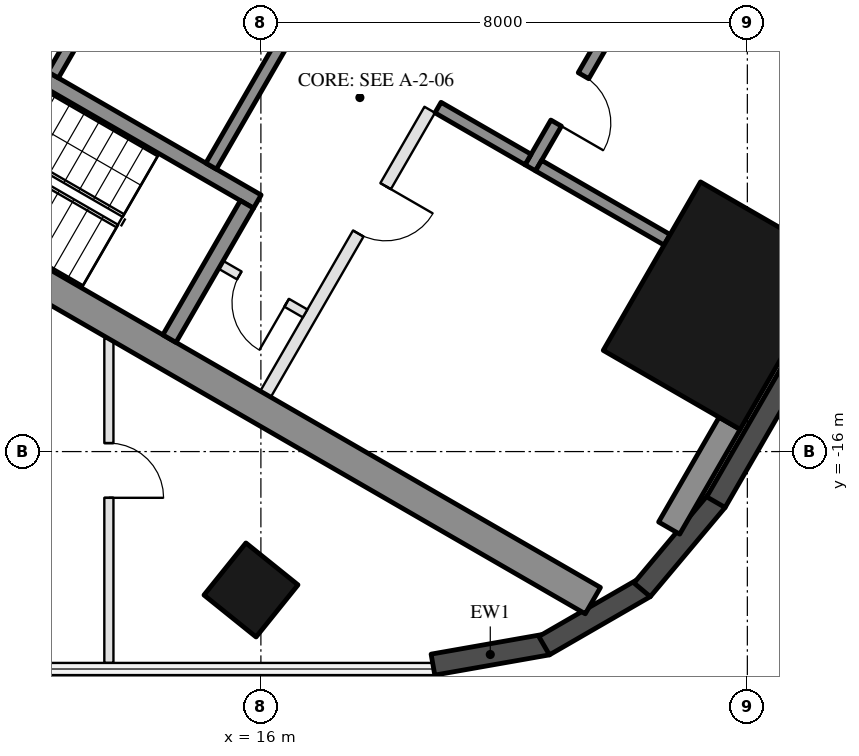
"""IFC4 building model, lengths in metres.
Left out: names, types, materials, properties, quantities, classifications, styles, units other than length and angle.
Written with IfcOpenShell. Run it as: python <this file> out.ifc"""

import sys

from ifc_helpers import new_model, si_unit, direction, frame, frame_2d, origin, origin_2d, place, context, subcontext, project, spatial, rectangle, hollow_rectangle, extrude, boolean, halfspace, element, fill, save


model = new_model("IFC4")
c1 = context("Model", 3, precision=1e-05, world=origin(), true_north=direction((0.0, 1.0)))
c2 = subcontext(c1, "Body", "Model", "MODEL_VIEW")
j1 = project(units=[si_unit("LENGTHUNIT", "METRE"), si_unit("PLANEANGLEUNIT", "RADIAN")], contexts=[c1])
p1 = place(None, origin())
s1 = spatial("IfcSite", under=j1, at=p1, CompositionType="ELEMENT")
p2 = place(p1, origin())
s2 = spatial("IfcBuilding", under=s1, at=p2, CompositionType="ELEMENT")
p3 = place(p2, frame((0.0, 0.0, 33.0)))
s3 = spatial("IfcBuildingStorey", under=s2, at=p3, CompositionType="ELEMENT", Elevation=33.0)
p4 = place(p3, frame((15.837, -18.276, 0.0), z_axis=(-0.008245813936, 0.010253018645, 0.999913437334), x_axis=(0.999965935277, -0.000282647683, 0.008249145105)))
e1 = element("IfcColumn", 1, at=p4, inside=s3, PredefinedType="COLUMN", context=c2, shape_type="SweptSolid", body=[
    boolean("DIFFERENCE", boolean("DIFFERENCE", extrude(hollow_rectangle(XDim=1.1, YDim=1.1, WallThickness=0.05, at=origin_2d()), origin(), (0.0, 0.0, 1.0), 4.5), halfspace(frame((0.0, 0.0, 0.012), z_axis=(0.0, 0.0, 1.0), x_axis=(1.0, 0.0, 0.0)), True)), halfspace(frame((0.0, 0.0, 4.493), z_axis=(0.0, 0.0, 1.0), x_axis=(1.0, 0.0, 0.0)), False)),
])
p5 = place(p3, frame((23.556, -13.6, 0.0), z_axis=(0.0, 0.0, 1.0), x_axis=(0.5, 0.866025403784, 0.0)))
e2 = element("IfcColumn", 2, at=p5, inside=s3, PredefinedType="COLUMN", context=c2, shape_type="SweptSolid", body=[
    extrude(hollow_rectangle(XDim=3.2, YDim=2.6, WallThickness=0.08, at=origin_2d()), origin(), (0.0, 0.0, 1.0), 4.5),
])
p6 = place(p3, frame((18.83, -19.504, 0.0), z_axis=(0.0, 0.0, 1.0), x_axis=(0.984824611058, 0.173552543785, 0.0)))
e3 = element("IfcWall", 3, at=p6, inside=s3, PredefinedType="SOLIDWALL", context=c2, shape_type="SweptSolid", body=[
    extrude(rectangle(XDim=1.915, YDim=0.35, at=frame_2d((0.957, 0.0))), origin(), (0.0, 0.0, 1.0), 4.2),
])
p7 = place(p3, frame((20.658, -19.192, 0.0), z_axis=(0.0, 0.0, 1.0), x_axis=(0.865990234582, 0.500060909899, 0.0)))
e4 = element("IfcWall", 4, at=p7, inside=s3, PredefinedType="SOLIDWALL", context=c2, shape_type="SweptSolid", body=[
    extrude(rectangle(XDim=1.915, YDim=0.35, at=frame_2d((0.958, 0.0))), origin(), (0.0, 0.0, 1.0), 4.2),
])
p8 = place(p3, frame((22.27, -18.274, 0.0), z_axis=(0.0, 0.0, 1.0), x_axis=(0.64282715853, 0.766011255959, 0.0)))
e5 = element("IfcWall", 5, at=p8, inside=s3, PredefinedType="SOLIDWALL", context=c2, shape_type="SweptSolid", body=[
    extrude(rectangle(XDim=1.915, YDim=0.35, at=frame_2d((0.957, 0.0))), origin(), (0.0, 0.0, 1.0), 4.2),
])
p9 = place(p3, frame((23.483, -16.832, 0.0), z_axis=(0.0, 0.0, 1.0), x_axis=(0.499982068559, 0.866035756259, 0.0)))
e6 = element("IfcWall", 6, at=p9, inside=s3, PredefinedType="SOLIDWALL", context=c2, shape_type="SweptSolid", body=[
    extrude(rectangle(XDim=5.671, YDim=0.35, at=frame_2d((2.835, 0.0))), origin(), (0.0, 0.0, 1.0), 4.2),
])
for number, where, z_axis, x_axis in (
    (7, (8.547, -10.997, 0.0), (0.0, 0.0, 1.0), (0.866, -0.5, 0.0)),
    (8, (13.797, -1.903, 0.0), (0.0, 0.0, 1.0), (0.866, -0.5, 0.0)),
):
    element("IfcWall", number, at=place(p3, frame(where, z_axis=z_axis, x_axis=x_axis)), inside=s3, PredefinedType="SHEAR", context=c2, shape_type="SweptSolid", body=[
        extrude(rectangle(XDim=14.91, YDim=0.5, at=frame_2d((7.455, 0.0))), origin(), (0.0, 0.0, 1.0), 4.2),
    ])
p10 = place(p3, frame((8.845, -10.88, 0.0), z_axis=(0.0, 0.0, 1.0), x_axis=(0.500004234368, 0.866022959057, 0.0)))
e9 = element("IfcWall", 9, at=p10, inside=s3, PredefinedType="SHEAR", context=c2, shape_type="SweptSolid", body=[
    extrude(rectangle(XDim=10.0, YDim=0.4, at=frame_2d((5.0, 0.0))), origin(), (0.0, 0.0, 1.0), 4.2),
])
p11 = place(p10, frame((3.55, 0.0, 0.0)))
e10 = element("IfcOpeningElement", 10, at=p11, cuts=e9, PredefinedType="OPENING", context=c2, shape_type="SweptSolid", body=[
    extrude(rectangle(XDim=1.1, YDim=2.1, at=frame_2d((0.55, 1.05))), frame((0.0, 0.21, 0.0), z_axis=(0.0, -1.0, 0.0), x_axis=(1.0, 0.0, 0.0)), (0.0, 0.0, 1.0), 0.42),
])
p12 = place(p10, frame((5.85, 0.0, 0.0)))
e11 = element("IfcOpeningElement", 11, at=p12, cuts=e9, PredefinedType="OPENING", context=c2, shape_type="SweptSolid", body=[
    extrude(rectangle(XDim=1.4, YDim=2.1, at=frame_2d((0.7, 1.05))), frame((0.0, 0.21, 0.0), z_axis=(0.0, -1.0, 0.0), x_axis=(1.0, 0.0, 0.0)), (0.0, 0.0, 1.0), 0.42),
])
p13 = place(p3, frame((22.714, -17.258, 0.0), z_axis=(0.0, 0.0, 1.0), x_axis=(0.499927872096, 0.866067042845, 0.0)))
e12 = element("IfcWall", 12, at=p13, inside=s3, PredefinedType="SHEAR", context=c2, shape_type="SweptSolid", body=[
    extrude(rectangle(XDim=1.989, YDim=0.4, at=frame_2d((0.995, 0.0))), origin(), (0.0, 0.0, 1.0), 4.2),
])
p14 = place(p3, frame((10.356, -8.664, 0.0), z_axis=(0.0, 0.0, 1.0), x_axis=(0.866028629588, -0.499994412703, 0.0)))
e13 = element("IfcWall", 13, at=p14, inside=s3, PredefinedType="SHEAR", context=c2, shape_type="SweptSolid", body=[
    extrude(rectangle(XDim=6.45, YDim=0.25, at=frame_2d((3.225, 0.0))), origin(), (0.0, 0.0, 1.0), 4.2),
])
p15 = place(p14, frame((0.3, 0.0, 0.0)))
e14 = element("IfcOpeningElement", 14, at=p15, cuts=e13, PredefinedType="OPENING", context=c2, shape_type="SweptSolid", body=[
    extrude(rectangle(XDim=1.0, YDim=2.1, at=frame_2d((0.5, 1.05))), frame((0.0, 0.135, 0.0), z_axis=(0.0, -1.0, 0.0), x_axis=(1.0, 0.0, 0.0)), (0.0, 0.0, 1.0), 0.27),
])
p16 = place(p3, frame((14.496, -14.143, 0.0), z_axis=(0.0, 0.0, 1.0), x_axis=(0.500062241894, 0.865989465428, 0.0)))
e15 = element("IfcWall", 15, at=p16, inside=s3, PredefinedType="SHEAR", context=c2, shape_type="SweptSolid", body=[
    extrude(rectangle(XDim=2.55, YDim=0.25, at=frame_2d((1.275, 0.0))), origin(), (0.0, 0.0, 1.0), 4.2),
])
p17 = place(p3, frame((15.181, -11.305, 0.0), z_axis=(0.0, 0.0, 1.0), x_axis=(0.49994636267, 0.866056369097, 0.0)))
e16 = element("IfcWall", 16, at=p17, inside=s3, PredefinedType="SHEAR", context=c2, shape_type="SweptSolid", body=[
    extrude(rectangle(XDim=2.8, YDim=0.2, at=frame_2d((1.4, 0.0))), origin(), (0.0, 0.0, 1.0), 4.2),
])
p18 = place(p3, frame((12.583, -9.805, 0.0), z_axis=(0.0, 0.0, 1.0), x_axis=(0.49994636267, 0.866056369097, 0.0)))
e17 = element("IfcWall", 17, at=p18, inside=s3, PredefinedType="SHEAR", context=c2, shape_type="SweptSolid", body=[
    extrude(rectangle(XDim=2.8, YDim=0.2, at=frame_2d((1.4, 0.0))), origin(), (0.0, 0.0, 1.0), 4.2),
])
p19 = place(p18, frame((0.7, 0.0, 0.0)))
e18 = element("IfcOpeningElement", 18, at=p19, cuts=e17, PredefinedType="OPENING", context=c2, shape_type="SweptSolid", body=[
    extrude(rectangle(XDim=1.2, YDim=2.1, at=frame_2d((0.6, 1.05))), frame((0.0, 0.11, 0.0), z_axis=(0.0, -1.0, 0.0), x_axis=(1.0, 0.0, 0.0)), (0.0, 0.0, 1.0), 0.22),
])
p20 = place(p3, frame((20.43, -11.333, 0.0), z_axis=(0.0, 0.0, 1.0), x_axis=(0.500001309137, 0.866024647952, 0.0)))
e19 = element("IfcWall", 19, at=p20, inside=s3, PredefinedType="SHEAR", context=c2, shape_type="SweptSolid", body=[
    extrude(rectangle(XDim=2.4, YDim=0.2, at=frame_2d((1.2, 0.0))), origin(), (0.0, 0.0, 1.0), 4.2),
])
p21 = place(p20, frame((0.85, 0.0, 0.0)))
e20 = element("IfcOpeningElement", 20, at=p21, cuts=e19, PredefinedType="OPENING", context=c2, shape_type="SweptSolid", body=[
    extrude(rectangle(XDim=0.9, YDim=2.1, at=frame_2d((0.45, 1.05))), frame((0.0, 0.11, 0.0), z_axis=(0.0, -1.0, 0.0), x_axis=(1.0, 0.0, 0.0)), (0.0, 0.0, 1.0), 0.22),
])
p22 = place(p3, frame((18.913, -10.342, 0.0), z_axis=(0.0, 0.0, 1.0), x_axis=(0.866038183914, -0.499977863513, 0.0)))
e21 = element("IfcWall", 21, at=p22, inside=s3, PredefinedType="SHEAR", context=c2, shape_type="SweptSolid", body=[
    extrude(rectangle(XDim=1.71, YDim=0.2, at=frame_2d((0.855, 0.0))), origin(), (0.0, 0.0, 1.0), 4.2),
])
p23 = place(p3, frame((20.567, -11.297, 0.0), z_axis=(0.0, 0.0, 1.0), x_axis=(0.866048967903, -0.499959183527, 0.0)))
e22 = element("IfcWall", 22, at=p23, inside=s3, PredefinedType="SHEAR", context=c2, shape_type="SweptSolid", body=[
    extrude(rectangle(XDim=2.44, YDim=0.2, at=frame_2d((1.22, 0.0))), origin(), (0.0, 0.0, 1.0), 4.2),
])
p24 = place(p3, frame((16.076, -15.055, 0.0), z_axis=(0.0, 0.0, 1.0), x_axis=(0.499995103361, 0.866028230842, 0.0)))
e23 = element("IfcWall", 23, at=p24, inside=s3, PredefinedType="PARTITIONING", context=c2, shape_type="SweptSolid", body=[
    extrude(rectangle(XDim=5.4, YDim=0.2, at=frame_2d((2.7, 0.0))), origin(), (0.0, 0.0, 1.0), 4.2),
])
p25 = place(p24, frame((3.05, 0.0, 0.0)))
e24 = element("IfcOpeningElement", 24, at=p25, cuts=e23, PredefinedType="OPENING", context=c2, shape_type="SweptSolid", body=[
    extrude(rectangle(XDim=0.9, YDim=2.1, at=frame_2d((0.45, 1.05))), frame((0.0, 0.11, 0.0), z_axis=(0.0, -1.0, 0.0), x_axis=(1.0, 0.0, 0.0)), (0.0, 0.0, 1.0), 0.22),
])
p26 = place(p3, frame((15.342, -12.928, 0.0), z_axis=(0.0, 0.0, 1.0), x_axis=(0.865989903783, -0.500061482766, 0.0)))
e25 = element("IfcWall", 25, at=p26, inside=s3, PredefinedType="PARTITIONING", context=c2, shape_type="SweptSolid", body=[
    extrude(rectangle(XDim=1.6, YDim=0.15, at=frame_2d((0.8, 0.0))), origin(), (0.0, 0.0, 1.0), 4.2),
])
p27 = place(p26, frame((0.35, 0.0, 0.0)))
e26 = element("IfcOpeningElement", 26, at=p27, cuts=e25, PredefinedType="OPENING", context=c2, shape_type="SweptSolid", body=[
    extrude(rectangle(XDim=0.9, YDim=2.1, at=frame_2d((0.45, 1.05))), frame((0.0, 0.085, 0.0), z_axis=(0.0, -1.0, 0.0), x_axis=(1.0, 0.0, 0.0)), (0.0, 0.0, 1.0), 0.17),
])
p28 = place(p3, frame((13.5, -19.476, 0.0), z_axis=(0.0, 0.0, 1.0), x_axis=(0.0, 1.0, 0.0)))
e27 = element("IfcWall", 27, at=p28, inside=s3, PredefinedType="PARTITIONING", context=c2, shape_type="SweptSolid", body=[
    extrude(rectangle(XDim=5.331, YDim=0.15, at=frame_2d((2.666, 0.0))), origin(), (0.0, 0.0, 1.0), 4.2),
])
p29 = place(p28, frame((2.716, 0.0, 0.0)))
e28 = element("IfcOpeningElement", 28, at=p29, cuts=e27, PredefinedType="OPENING", context=c2, shape_type="SweptSolid", body=[
    extrude(rectangle(XDim=0.9, YDim=2.1, at=frame_2d((0.45, 1.05))), frame((0.0, 0.085, 0.0), z_axis=(0.0, -1.0, 0.0), x_axis=(1.0, 0.0, 0.0)), (0.0, 0.0, 1.0), 0.17),
])
p30 = place(p27, frame((0.9, 0.0, 0.0), z_axis=(0.0, 0.0, 1.0), x_axis=(-1.0, 0.0, 0.0)))
e29 = element("IfcDoor", 29, at=p30, inside=s3, OperationType="SINGLE_SWING_LEFT", PredefinedType="DOOR", context=c2, shape_type="SweptSolid", body=[
    extrude(rectangle(XDim=0.9, YDim=2.1, at=frame_2d((0.45, 1.05))), frame((0.0, 0.025, 0.0), z_axis=(0.0, -1.0, 0.0), x_axis=(1.0, 0.0, 0.0)), (0.0, 0.0, 1.0), 0.05),
])
fill(e26, e29)
p31 = place(p21, frame((0.9, 0.0, 0.0), z_axis=(0.0, 0.0, 1.0), x_axis=(-1.0, 0.0, 0.0)))
e30 = element("IfcDoor", 30, at=p31, inside=s3, OperationType="SINGLE_SWING_RIGHT", PredefinedType="DOOR", context=c2, shape_type="SweptSolid", body=[
    extrude(rectangle(XDim=0.9, YDim=2.1, at=frame_2d((0.45, 1.05))), frame((0.0, 0.025, 0.0), z_axis=(0.0, -1.0, 0.0), x_axis=(1.0, 0.0, 0.0)), (0.0, 0.0, 1.0), 0.05),
])
fill(e20, e30)
p32 = place(p25, frame((0.9, 0.0, 0.0), z_axis=(0.0, 0.0, 1.0), x_axis=(-1.0, 0.0, 0.0)))
e31 = element("IfcDoor", 31, at=p32, inside=s3, OperationType="SINGLE_SWING_LEFT", PredefinedType="DOOR", context=c2, shape_type="SweptSolid", body=[
    extrude(rectangle(XDim=0.9, YDim=2.1, at=frame_2d((0.45, 1.05))), frame((0.0, 0.025, 0.0), z_axis=(0.0, -1.0, 0.0), x_axis=(1.0, 0.0, 0.0)), (0.0, 0.0, 1.0), 0.05),
])
fill(e24, e31)
p33 = place(p29, frame((0.9, 0.0, 0.0), z_axis=(0.0, 0.0, 1.0), x_axis=(-1.0, 0.0, 0.0)))
e32 = element("IfcDoor", 32, at=p33, inside=s3, OperationType="SINGLE_SWING_RIGHT", PredefinedType="DOOR", context=c2, shape_type="SweptSolid", body=[
    extrude(rectangle(XDim=0.9, YDim=2.1, at=frame_2d((0.45, 1.05))), frame((0.0, 0.025, 0.0), z_axis=(0.0, -1.0, 0.0), x_axis=(1.0, 0.0, 0.0)), (0.0, 0.0, 1.0), 0.05),
])
fill(e28, e32)
save(model, sys.argv[1])
